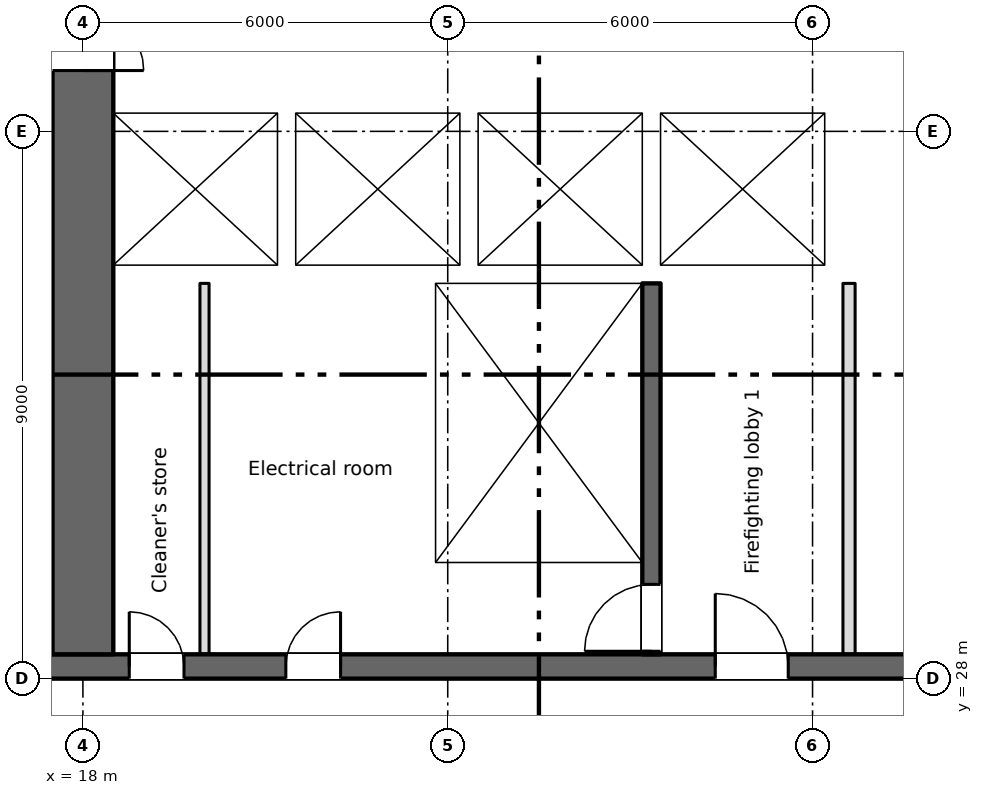
"""IFC4 building model, lengths in metres.
Left out: names, types, materials, properties, quantities, classifications, styles, units other than length and angle.
Written with IfcOpenShell. Run it as: python <this file> out.ifc"""

import sys

from ifc_helpers import new_model, si_unit, direction, frame, frame_2d, origin, place, context, subcontext, project, spatial, rectangle, extrude, element, fill, save


model = new_model("IFC4")
c1 = context("Model", 3, precision=1e-05, world=origin(), true_north=direction((0.0, 1.0)))
c2 = subcontext(c1, "Body", "Model", "MODEL_VIEW")
j1 = project(units=[si_unit("LENGTHUNIT", "METRE"), si_unit("PLANEANGLEUNIT", "RADIAN")], contexts=[c1])
p1 = place(None, origin())
s1 = spatial("IfcSite", under=j1, at=p1, CompositionType="ELEMENT")
p2 = place(p1, origin())
s2 = spatial("IfcBuilding", under=s1, at=p2, CompositionType="ELEMENT")
p3 = place(p2, frame((0.0, 0.0, 37.5)))
s3 = spatial("IfcBuildingStorey", under=s2, at=p3, CompositionType="ELEMENT", Elevation=37.5)
p4 = place(p3, frame((6.7, 28.2, 0.0), z_axis=(0.0, 0.0, 1.0), x_axis=(1.0, 0.0, 0.0)))
e1 = element("IfcWall", 1, at=p4, inside=s3, PredefinedType="SHEAR", context=c2, shape_type="SweptSolid", body=[
    extrude(rectangle(XDim=57.8, YDim=0.4, at=frame_2d((28.9, 0.0))), origin(), (0.0, 0.0, 1.0), 3.35),
])
p5 = place(p4, frame((12.062, 0.0, 0.0)))
e2 = element("IfcOpeningElement", 2, at=p5, cuts=e1, PredefinedType="OPENING", context=c2, shape_type="SweptSolid", body=[
    extrude(rectangle(XDim=0.9, YDim=2.1, at=frame_2d((0.45, 1.05))), frame((0.0, 0.21, 0.0), z_axis=(0.0, -1.0, 0.0), x_axis=(1.0, 0.0, 0.0)), (0.0, 0.0, 1.0), 0.42),
])
p6 = place(p4, frame((14.637, 0.0, 0.0)))
e3 = element("IfcOpeningElement", 3, at=p6, cuts=e1, PredefinedType="OPENING", context=c2, shape_type="SweptSolid", body=[
    extrude(rectangle(XDim=0.9, YDim=2.1, at=frame_2d((0.45, 1.05))), frame((0.0, 0.21, 0.0), z_axis=(0.0, -1.0, 0.0), x_axis=(1.0, 0.0, 0.0)), (0.0, 0.0, 1.0), 0.42),
])
p7 = place(p4, frame((49.062, 0.0, 0.0)))
e4 = element("IfcOpeningElement", 4, at=p7, cuts=e1, PredefinedType="OPENING", context=c2, shape_type="SweptSolid", body=[
    extrude(rectangle(XDim=0.9, YDim=2.1, at=frame_2d((0.45, 1.05))), frame((0.0, 0.21, 0.0), z_axis=(0.0, -1.0, 0.0), x_axis=(1.0, 0.0, 0.0)), (0.0, 0.0, 1.0), 0.42),
])
p8 = place(p4, frame((51.637, 0.0, 0.0)))
e5 = element("IfcOpeningElement", 5, at=p8, cuts=e1, PredefinedType="OPENING", context=c2, shape_type="SweptSolid", body=[
    extrude(rectangle(XDim=0.9, YDim=2.1, at=frame_2d((0.45, 1.05))), frame((0.0, 0.21, 0.0), z_axis=(0.0, -1.0, 0.0), x_axis=(1.0, 0.0, 0.0)), (0.0, 0.0, 1.0), 0.42),
])
p9 = place(p4, frame((1.35, 0.0, 0.0)))
e6 = element("IfcOpeningElement", 6, at=p9, cuts=e1, PredefinedType="OPENING", context=c2, shape_type="SweptSolid", body=[
    extrude(rectangle(XDim=0.9, YDim=2.1, at=frame_2d((0.45, 1.05))), frame((0.0, 0.21, 0.0), z_axis=(0.0, -1.0, 0.0), x_axis=(1.0, 0.0, 0.0)), (0.0, 0.0, 1.0), 0.42),
])
p10 = place(p4, frame((4.7, 0.0, 0.0)))
e7 = element("IfcOpeningElement", 7, at=p10, cuts=e1, PredefinedType="OPENING", context=c2, shape_type="SweptSolid", body=[
    extrude(rectangle(XDim=1.2, YDim=2.1, at=frame_2d((0.6, 1.05))), frame((0.0, 0.21, 0.0), z_axis=(0.0, -1.0, 0.0), x_axis=(1.0, 0.0, 0.0)), (0.0, 0.0, 1.0), 0.42),
])
p11 = place(p4, frame((31.7, 0.0, 0.0)))
e8 = element("IfcOpeningElement", 8, at=p11, cuts=e1, PredefinedType="OPENING", context=c2, shape_type="SweptSolid", body=[
    extrude(rectangle(XDim=1.2, YDim=2.1, at=frame_2d((0.6, 1.05))), frame((0.0, 0.21, 0.0), z_axis=(0.0, -1.0, 0.0), x_axis=(1.0, 0.0, 0.0)), (0.0, 0.0, 1.0), 0.42),
])
p12 = place(p4, frame((55.2, 0.0, 0.0)))
e9 = element("IfcOpeningElement", 9, at=p12, cuts=e1, PredefinedType="OPENING", context=c2, shape_type="SweptSolid", body=[
    extrude(rectangle(XDim=1.2, YDim=2.1, at=frame_2d((0.6, 1.05))), frame((0.0, 0.21, 0.0), z_axis=(0.0, -1.0, 0.0), x_axis=(1.0, 0.0, 0.0)), (0.0, 0.0, 1.0), 0.42),
])
p13 = place(p4, frame((21.7, 0.0, 0.0)))
e10 = element("IfcOpeningElement", 10, at=p13, cuts=e1, PredefinedType="OPENING", context=c2, shape_type="SweptSolid", body=[
    extrude(rectangle(XDim=1.2, YDim=2.1, at=frame_2d((0.6, 1.05))), frame((0.0, 0.21, 0.0), z_axis=(0.0, -1.0, 0.0), x_axis=(1.0, 0.0, 0.0)), (0.0, 0.0, 1.0), 0.42),
])
p14 = place(p4, frame((41.7, 0.0, 0.0)))
e11 = element("IfcOpeningElement", 11, at=p14, cuts=e1, PredefinedType="OPENING", context=c2, shape_type="SweptSolid", body=[
    extrude(rectangle(XDim=1.2, YDim=2.1, at=frame_2d((0.6, 1.05))), frame((0.0, 0.21, 0.0), z_axis=(0.0, -1.0, 0.0), x_axis=(1.0, 0.0, 0.0)), (0.0, 0.0, 1.0), 0.42),
])
p15 = place(p4, frame((24.85, 0.0, 0.0)))
e12 = element("IfcOpeningElement", 12, at=p15, cuts=e1, PredefinedType="OPENING", context=c2, shape_type="SweptSolid", body=[
    extrude(rectangle(XDim=2.4, YDim=2.1, at=frame_2d((1.2, 1.05))), frame((0.0, 0.21, 0.0), z_axis=(0.0, -1.0, 0.0), x_axis=(1.0, 0.0, 0.0)), (0.0, 0.0, 1.0), 0.42),
])
p16 = place(p4, frame((37.35, 0.0, 0.0)))
e13 = element("IfcOpeningElement", 13, at=p16, cuts=e1, PredefinedType="OPENING", context=c2, shape_type="SweptSolid", body=[
    extrude(rectangle(XDim=2.4, YDim=2.1, at=frame_2d((1.2, 1.05))), frame((0.0, 0.21, 0.0), z_axis=(0.0, -1.0, 0.0), x_axis=(1.0, 0.0, 0.0)), (0.0, 0.0, 1.0), 0.42),
])
p17 = place(p4, frame((7.85, 0.0, 0.0)))
e14 = element("IfcOpeningElement", 14, at=p17, cuts=e1, PredefinedType="OPENING", context=c2, shape_type="SweptSolid", body=[
    extrude(rectangle(XDim=2.4, YDim=2.1, at=frame_2d((1.2, 1.05))), frame((0.0, 0.21, 0.0), z_axis=(0.0, -1.0, 0.0), x_axis=(1.0, 0.0, 0.0)), (0.0, 0.0, 1.0), 0.42),
])
p18 = place(p4, frame((28.85, 0.0, 0.0)))
e15 = element("IfcOpeningElement", 15, at=p18, cuts=e1, PredefinedType="OPENING", context=c2, shape_type="SweptSolid", body=[
    extrude(rectangle(XDim=0.9, YDim=2.1, at=frame_2d((0.45, 1.05))), frame((0.0, 0.21, 0.0), z_axis=(0.0, -1.0, 0.0), x_axis=(1.0, 0.0, 0.0)), (0.0, 0.0, 1.0), 0.42),
])
p19 = place(p4, frame((34.85, 0.0, 0.0)))
e16 = element("IfcOpeningElement", 16, at=p19, cuts=e1, PredefinedType="OPENING", context=c2, shape_type="SweptSolid", body=[
    extrude(rectangle(XDim=0.9, YDim=2.1, at=frame_2d((0.45, 1.05))), frame((0.0, 0.21, 0.0), z_axis=(0.0, -1.0, 0.0), x_axis=(1.0, 0.0, 0.0)), (0.0, 0.0, 1.0), 0.42),
])
p20 = place(p3, frame((18.0, 28.4, 0.0), z_axis=(0.0, 0.0, 1.0), x_axis=(0.0, 1.0, 0.0)))
e17 = element("IfcWall", 17, at=p20, inside=s3, PredefinedType="SHEAR", context=c2, shape_type="SweptSolid", body=[
    extrude(rectangle(XDim=16.6, YDim=1.0, at=frame_2d((8.3, 0.0))), origin(), (0.0, 0.0, 1.0), 3.35),
])
p21 = place(p20, frame((9.6, 0.0, 0.0)))
e18 = element("IfcOpeningElement", 18, at=p21, cuts=e17, PredefinedType="OPENING", context=c2, shape_type="SweptSolid", body=[
    extrude(rectangle(XDim=2.0, YDim=2.1, at=frame_2d((1.0, 1.05))), frame((0.0, 0.51, 0.0), z_axis=(0.0, -1.0, 0.0), x_axis=(1.0, 0.0, 0.0)), (0.0, 0.0, 1.0), 1.02),
])
p22 = place(p20, frame((15.25, 0.0, 0.0)))
e19 = element("IfcOpeningElement", 19, at=p22, cuts=e17, PredefinedType="OPENING", context=c2, shape_type="SweptSolid", body=[
    extrude(rectangle(XDim=1.2, YDim=2.1, at=frame_2d((0.6, 1.05))), frame((0.0, 0.51, 0.0), z_axis=(0.0, -1.0, 0.0), x_axis=(1.0, 0.0, 0.0)), (0.0, 0.0, 1.0), 1.02),
])
p23 = place(p3, frame((23.65, 28.4, 0.0), z_axis=(0.0, 0.0, 1.0), x_axis=(0.0, 1.0, 0.0)))
e20 = element("IfcWall", 20, at=p23, inside=s3, PredefinedType="SHEAR", context=c2, shape_type="SweptSolid", body=[
    extrude(rectangle(XDim=6.1, YDim=0.3, at=frame_2d((3.05, 0.0))), origin(), (0.0, 0.0, 1.0), 3.35),
])
p24 = place(p3, frame((27.35, 28.4, 0.0), z_axis=(0.0, 0.0, 1.0), x_axis=(0.0, 1.0, 0.0)))
e21 = element("IfcWall", 21, at=p24, inside=s3, PredefinedType="SHEAR", context=c2, shape_type="SweptSolid", body=[
    extrude(rectangle(XDim=6.1, YDim=0.3, at=frame_2d((3.05, 0.0))), origin(), (0.0, 0.0, 1.0), 3.35),
])
p25 = place(p24, frame((0.05, 0.0, 0.0)))
e22 = element("IfcOpeningElement", 22, at=p25, cuts=e21, PredefinedType="OPENING", context=c2, shape_type="SweptSolid", body=[
    extrude(rectangle(XDim=1.1, YDim=2.1, at=frame_2d((0.55, 1.05))), frame((0.0, 0.16, 0.0), z_axis=(0.0, -1.0, 0.0), x_axis=(1.0, 0.0, 0.0)), (0.0, 0.0, 1.0), 0.32),
])
p26 = place(p3, frame((18.5, 34.65, 0.0), z_axis=(0.0, 0.0, 1.0), x_axis=(1.0, 0.0, 0.0)))
e23 = element("IfcWall", 23, at=p26, inside=s3, PredefinedType="SHEAR", context=c2, shape_type="SweptSolid", body=[
    extrude(rectangle(XDim=12.2, YDim=0.3, at=frame_2d((6.1, 0.0))), origin(), (0.0, 0.0, 1.0), 3.35),
])
p27 = place(p26, frame((9.8, 0.0, 0.0)))
e24 = element("IfcOpeningElement", 24, at=p27, cuts=e23, PredefinedType="OPENING", context=c2, shape_type="SweptSolid", body=[
    extrude(rectangle(XDim=1.1, YDim=2.1, at=frame_2d((0.55, 1.05))), frame((0.0, 0.16, 0.0), z_axis=(0.0, -1.0, 0.0), x_axis=(1.0, 0.0, 0.0)), (0.0, 0.0, 1.0), 0.32),
])
p28 = place(p3, frame((18.5, 37.45, 0.0), z_axis=(0.0, 0.0, 1.0), x_axis=(1.0, 0.0, 0.0)))
e25 = element("IfcWall", 25, at=p28, inside=s3, PredefinedType="SHEAR", context=c2, shape_type="SweptSolid", body=[
    extrude(rectangle(XDim=12.2, YDim=0.3, at=frame_2d((6.1, 0.0))), origin(), (0.0, 0.0, 1.0), 3.35),
])
p29 = place(p28, frame((0.8, 0.0, 0.0)))
e26 = element("IfcOpeningElement", 26, at=p29, cuts=e25, PredefinedType="OPENING", context=c2, shape_type="SweptSolid", body=[
    extrude(rectangle(XDim=1.1, YDim=2.1, at=frame_2d((0.55, 1.05))), frame((0.0, 0.16, 0.0), z_axis=(0.0, -1.0, 0.0), x_axis=(1.0, 0.0, 0.0)), (0.0, 0.0, 1.0), 0.32),
])
p30 = place(p28, frame((3.8, 0.0, 0.0)))
e27 = element("IfcOpeningElement", 27, at=p30, cuts=e25, PredefinedType="OPENING", context=c2, shape_type="SweptSolid", body=[
    extrude(rectangle(XDim=1.1, YDim=2.1, at=frame_2d((0.55, 1.05))), frame((0.0, 0.16, 0.0), z_axis=(0.0, -1.0, 0.0), x_axis=(1.0, 0.0, 0.0)), (0.0, 0.0, 1.0), 0.32),
])
p31 = place(p28, frame((6.8, 0.0, 0.0)))
e28 = element("IfcOpeningElement", 28, at=p31, cuts=e25, PredefinedType="OPENING", context=c2, shape_type="SweptSolid", body=[
    extrude(rectangle(XDim=1.1, YDim=2.1, at=frame_2d((0.55, 1.05))), frame((0.0, 0.16, 0.0), z_axis=(0.0, -1.0, 0.0), x_axis=(1.0, 0.0, 0.0)), (0.0, 0.0, 1.0), 0.32),
])
p32 = place(p3, frame((27.35, 34.8, 0.0), z_axis=(0.0, 0.0, 1.0), x_axis=(0.0, 1.0, 0.0)))
e29 = element("IfcWall", 29, at=p32, inside=s3, PredefinedType="SHEAR", context=c2, shape_type="SweptSolid", body=[
    extrude(rectangle(XDim=2.5, YDim=0.3, at=frame_2d((1.25, 0.0))), origin(), (0.0, 0.0, 1.0), 3.35),
])
p33 = place(p3, frame((30.45, 34.8, 0.0), z_axis=(0.0, 0.0, 1.0), x_axis=(0.0, 1.0, 0.0)))
e30 = element("IfcWall", 30, at=p33, inside=s3, PredefinedType="SHEAR", context=c2, shape_type="SweptSolid", body=[
    extrude(rectangle(XDim=2.5, YDim=0.5, at=frame_2d((1.25, 0.0))), origin(), (0.0, 0.0, 1.0), 3.35),
])
for number, where, z_axis, x_axis in (
    (31, (21.35, 34.8, 0.0), (0.0, 0.0, 1.0), (0.0, 1.0, 0.0)),
    (32, (24.35, 34.8, 0.0), (0.0, 0.0, 1.0), (0.0, 1.0, 0.0)),
):
    element("IfcWall", number, at=place(p3, frame(where, z_axis=z_axis, x_axis=x_axis)), inside=s3, PredefinedType="SHEAR", context=c2, shape_type="SweptSolid", body=[
        extrude(rectangle(XDim=2.5, YDim=0.3, at=frame_2d((1.25, 0.0))), origin(), (0.0, 0.0, 1.0), 3.35),
    ])
p34 = place(p3, frame((30.6, 28.4, 0.0), z_axis=(0.0, 0.0, 1.0), x_axis=(0.0, 1.0, 0.0)))
e33 = element("IfcWall", 33, at=p34, inside=s3, PredefinedType="PARTITIONING", context=c2, shape_type="SweptSolid", body=[
    extrude(rectangle(XDim=6.1, YDim=0.2, at=frame_2d((3.05, 0.0))), origin(), (0.0, 0.0, 1.0), 3.35),
])
p35 = place(p3, frame((20.0, 28.4, 0.0), z_axis=(0.0, 0.0, 1.0), x_axis=(0.0, 1.0, 0.0)))
e34 = element("IfcWall", 34, at=p35, inside=s3, PredefinedType="PARTITIONING", context=c2, shape_type="SweptSolid", body=[
    extrude(rectangle(XDim=6.1, YDim=0.15, at=frame_2d((3.05, 0.0))), origin(), (0.0, 0.0, 1.0), 3.35),
])
p36 = place(p5, origin())
e35 = element("IfcDoor", 35, at=p36, inside=s3, OperationType="SINGLE_SWING_LEFT", PredefinedType="DOOR", context=c2, shape_type="SweptSolid", body=[
    extrude(rectangle(XDim=0.9, YDim=2.1, at=frame_2d((0.45, 1.05))), frame((0.0, 0.025, 0.0), z_axis=(0.0, -1.0, 0.0), x_axis=(1.0, 0.0, 0.0)), (0.0, 0.0, 1.0), 0.05),
])
fill(e2, e35)
p37 = place(p6, origin())
e36 = element("IfcDoor", 36, at=p37, inside=s3, OperationType="SINGLE_SWING_RIGHT", PredefinedType="DOOR", context=c2, shape_type="SweptSolid", body=[
    extrude(rectangle(XDim=0.9, YDim=2.1, at=frame_2d((0.45, 1.05))), frame((0.0, 0.025, 0.0), z_axis=(0.0, -1.0, 0.0), x_axis=(1.0, 0.0, 0.0)), (0.0, 0.0, 1.0), 0.05),
])
fill(e3, e36)
p38 = place(p29, origin())
e37 = element("IfcDoor", 37, at=p38, inside=s3, OperationType="SLIDING_TO_LEFT", PredefinedType="DOOR", context=c2, shape_type="SweptSolid", body=[
    extrude(rectangle(XDim=1.1, YDim=2.1, at=frame_2d((0.55, 1.05))), frame((0.0, 0.025, 0.0), z_axis=(0.0, -1.0, 0.0), x_axis=(1.0, 0.0, 0.0)), (0.0, 0.0, 1.0), 0.05),
])
fill(e26, e37)
p39 = place(p30, origin())
e38 = element("IfcDoor", 38, at=p39, inside=s3, OperationType="SLIDING_TO_LEFT", PredefinedType="DOOR", context=c2, shape_type="SweptSolid", body=[
    extrude(rectangle(XDim=1.1, YDim=2.1, at=frame_2d((0.55, 1.05))), frame((0.0, 0.025, 0.0), z_axis=(0.0, -1.0, 0.0), x_axis=(1.0, 0.0, 0.0)), (0.0, 0.0, 1.0), 0.05),
])
fill(e27, e38)
p40 = place(p31, origin())
e39 = element("IfcDoor", 39, at=p40, inside=s3, OperationType="SLIDING_TO_LEFT", PredefinedType="DOOR", context=c2, shape_type="SweptSolid", body=[
    extrude(rectangle(XDim=1.1, YDim=2.1, at=frame_2d((0.55, 1.05))), frame((0.0, 0.025, 0.0), z_axis=(0.0, -1.0, 0.0), x_axis=(1.0, 0.0, 0.0)), (0.0, 0.0, 1.0), 0.05),
])
fill(e28, e39)
p41 = place(p27, origin())
e40 = element("IfcDoor", 40, at=p41, inside=s3, OperationType="SLIDING_TO_LEFT", PredefinedType="DOOR", context=c2, shape_type="SweptSolid", body=[
    extrude(rectangle(XDim=1.1, YDim=2.1, at=frame_2d((0.55, 1.05))), frame((0.0, 0.025, 0.0), z_axis=(0.0, -1.0, 0.0), x_axis=(1.0, 0.0, 0.0)), (0.0, 0.0, 1.0), 0.05),
])
fill(e24, e40)
p42 = place(p25, origin())
e41 = element("IfcDoor", 41, at=p42, inside=s3, OperationType="SINGLE_SWING_LEFT", PredefinedType="DOOR", context=c2, shape_type="SweptSolid", body=[
    extrude(rectangle(XDim=1.1, YDim=2.1, at=frame_2d((0.55, 1.05))), frame((0.0, 0.025, 0.0), z_axis=(0.0, -1.0, 0.0), x_axis=(1.0, 0.0, 0.0)), (0.0, 0.0, 1.0), 0.05),
])
fill(e22, e41)
p43 = place(p13, origin())
e42 = element("IfcDoor", 42, at=p43, inside=s3, OperationType="SINGLE_SWING_LEFT", PredefinedType="DOOR", context=c2, shape_type="SweptSolid", body=[
    extrude(rectangle(XDim=1.2, YDim=2.1, at=frame_2d((0.6, 1.05))), frame((0.0, 0.025, 0.0), z_axis=(0.0, -1.0, 0.0), x_axis=(1.0, 0.0, 0.0)), (0.0, 0.0, 1.0), 0.05),
])
fill(e10, e42)
p44 = place(p21, origin())
e43 = element("IfcDoor", 43, at=p44, inside=s3, OperationType="DOUBLE_DOOR_SINGLE_SWING", PredefinedType="DOOR", context=c2, shape_type="SweptSolid", body=[
    extrude(rectangle(XDim=2.0, YDim=2.1, at=frame_2d((1.0, 1.05))), frame((0.0, 0.025, 0.0), z_axis=(0.0, -1.0, 0.0), x_axis=(1.0, 0.0, 0.0)), (0.0, 0.0, 1.0), 0.05),
])
fill(e18, e43)
save(model, sys.argv[1])
